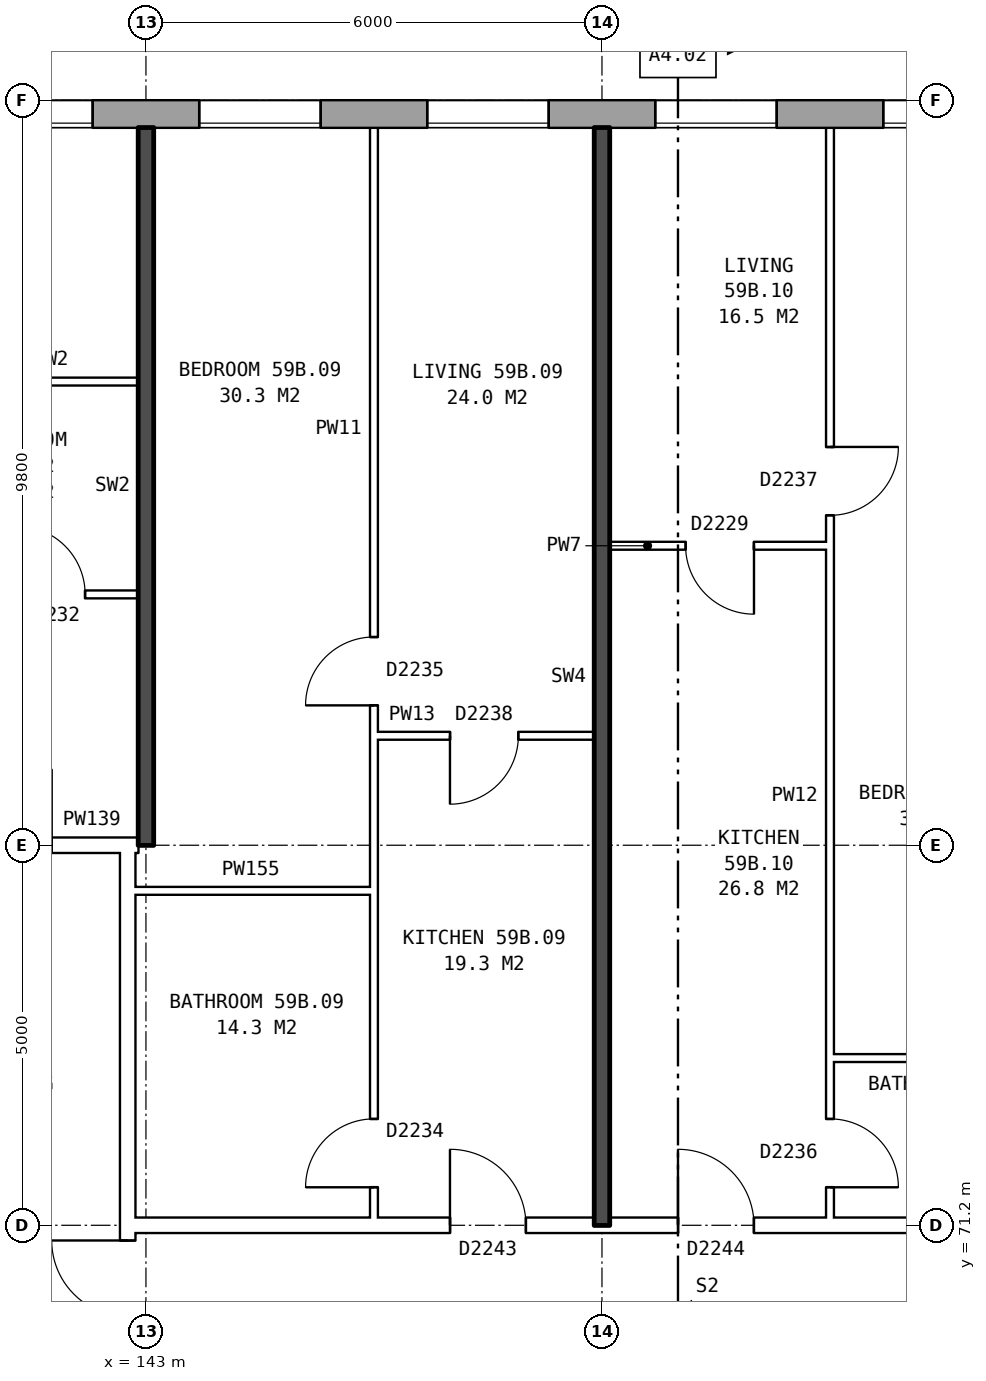
"""IFC4 building model, lengths in metres.
Left out: names, types, materials, properties, quantities, classifications, styles, units other than length and angle.
Written with IfcOpenShell. Run it as: python <this file> out.ifc"""

import sys

from ifc_helpers import new_model, si_unit, direction, frame, frame_2d, origin, place, context, subcontext, project, spatial, rectangle, extrude, element, fill, save


model = new_model("IFC4")
c1 = context("Model", 3, precision=1e-05, world=origin(), true_north=direction((0.0, 1.0)))
c2 = subcontext(c1, "Body", "Model", "MODEL_VIEW")
j1 = project(units=[si_unit("LENGTHUNIT", "METRE"), si_unit("PLANEANGLEUNIT", "RADIAN")], contexts=[c1])
p1 = place(None, origin())
s1 = spatial("IfcSite", under=j1, at=p1, CompositionType="ELEMENT")
p2 = place(p1, origin())
s2 = spatial("IfcBuilding", under=s1, at=p2, CompositionType="ELEMENT")
p3 = place(p2, frame((0.0, 0.0, 209.0)))
s3 = spatial("IfcBuildingStorey", under=s2, at=p3, CompositionType="ELEMENT", Elevation=209.0)
p4 = place(p3, frame((165.925, 85.82, 0.0), z_axis=(0.0, 0.0, 1.0), x_axis=(-1.0, 0.0, 0.0)))
e1 = element("IfcWall", 1, at=p4, inside=s3, PredefinedType="STANDARD", context=c2, shape_type="SweptSolid", body=[
    extrude(rectangle(XDim=33.875, YDim=0.36, at=frame_2d((16.938, 0.0))), origin(), (0.0, 0.0, 1.0), 2.85),
])
p5 = place(p4, frame((2.625, 0.0, 0.8)))
e2 = element("IfcOpeningElement", 2, at=p5, cuts=e1, PredefinedType="OPENING", context=c2, shape_type="SweptSolid", body=[
    extrude(rectangle(XDim=1.6, YDim=1.8, at=frame_2d((0.8, 0.9))), frame((0.0, 0.19, 0.0), z_axis=(0.0, -1.0, 0.0), x_axis=(1.0, 0.0, 0.0)), (0.0, 0.0, 1.0), 0.38),
])
p6 = place(p4, frame((5.625, 0.0, 0.8)))
e3 = element("IfcOpeningElement", 3, at=p6, cuts=e1, PredefinedType="OPENING", context=c2, shape_type="SweptSolid", body=[
    extrude(rectangle(XDim=1.6, YDim=1.8, at=frame_2d((0.8, 0.9))), frame((0.0, 0.19, 0.0), z_axis=(0.0, -1.0, 0.0), x_axis=(1.0, 0.0, 0.0)), (0.0, 0.0, 1.0), 0.38),
])
p7 = place(p4, frame((8.625, 0.0, 0.8)))
e4 = element("IfcOpeningElement", 4, at=p7, cuts=e1, PredefinedType="OPENING", context=c2, shape_type="SweptSolid", body=[
    extrude(rectangle(XDim=1.6, YDim=1.8, at=frame_2d((0.8, 0.9))), frame((0.0, 0.19, 0.0), z_axis=(0.0, -1.0, 0.0), x_axis=(1.0, 0.0, 0.0)), (0.0, 0.0, 1.0), 0.38),
])
p8 = place(p4, frame((11.625, 0.0, 0.8)))
e5 = element("IfcOpeningElement", 5, at=p8, cuts=e1, PredefinedType="OPENING", context=c2, shape_type="SweptSolid", body=[
    extrude(rectangle(XDim=1.6, YDim=1.8, at=frame_2d((0.8, 0.9))), frame((0.0, 0.19, 0.0), z_axis=(0.0, -1.0, 0.0), x_axis=(1.0, 0.0, 0.0)), (0.0, 0.0, 1.0), 0.38),
])
p9 = place(p4, frame((14.625, 0.0, 0.8)))
e6 = element("IfcOpeningElement", 6, at=p9, cuts=e1, PredefinedType="OPENING", context=c2, shape_type="SweptSolid", body=[
    extrude(rectangle(XDim=1.6, YDim=1.8, at=frame_2d((0.8, 0.9))), frame((0.0, 0.19, 0.0), z_axis=(0.0, -1.0, 0.0), x_axis=(1.0, 0.0, 0.0)), (0.0, 0.0, 1.0), 0.38),
])
p10 = place(p4, frame((17.625, 0.0, 0.8)))
e7 = element("IfcOpeningElement", 7, at=p10, cuts=e1, PredefinedType="OPENING", context=c2, shape_type="SweptSolid", body=[
    extrude(rectangle(XDim=1.6, YDim=1.8, at=frame_2d((0.8, 0.9))), frame((0.0, 0.19, 0.0), z_axis=(0.0, -1.0, 0.0), x_axis=(1.0, 0.0, 0.0)), (0.0, 0.0, 1.0), 0.38),
])
p11 = place(p4, frame((20.625, 0.0, 0.8)))
e8 = element("IfcOpeningElement", 8, at=p11, cuts=e1, PredefinedType="OPENING", context=c2, shape_type="SweptSolid", body=[
    extrude(rectangle(XDim=1.6, YDim=1.8, at=frame_2d((0.8, 0.9))), frame((0.0, 0.19, 0.0), z_axis=(0.0, -1.0, 0.0), x_axis=(1.0, 0.0, 0.0)), (0.0, 0.0, 1.0), 0.38),
])
p12 = place(p4, frame((23.625, 0.0, 0.8)))
e9 = element("IfcOpeningElement", 9, at=p12, cuts=e1, PredefinedType="OPENING", context=c2, shape_type="SweptSolid", body=[
    extrude(rectangle(XDim=1.6, YDim=1.8, at=frame_2d((0.8, 0.9))), frame((0.0, 0.19, 0.0), z_axis=(0.0, -1.0, 0.0), x_axis=(1.0, 0.0, 0.0)), (0.0, 0.0, 1.0), 0.38),
])
p13 = place(p4, frame((26.625, 0.0, 0.8)))
e10 = element("IfcOpeningElement", 10, at=p13, cuts=e1, PredefinedType="OPENING", context=c2, shape_type="SweptSolid", body=[
    extrude(rectangle(XDim=1.6, YDim=1.8, at=frame_2d((0.8, 0.9))), frame((0.0, 0.19, 0.0), z_axis=(0.0, -1.0, 0.0), x_axis=(1.0, 0.0, 0.0)), (0.0, 0.0, 1.0), 0.38),
])
p14 = place(p4, frame((30.925, 0.0, 1.1)))
e11 = element("IfcOpeningElement", 11, at=p14, cuts=e1, PredefinedType="OPENING", context=c2, shape_type="SweptSolid", body=[
    extrude(rectangle(XDim=0.8, YDim=1.5, at=frame_2d((0.4, 0.75))), frame((0.0, 0.19, 0.0), z_axis=(0.0, -1.0, 0.0), x_axis=(1.0, 0.0, 0.0)), (0.0, 0.0, 1.0), 0.38),
])
p15 = place(p4, frame((32.025, 0.0, 0.8)))
e12 = element("IfcOpeningElement", 12, at=p15, cuts=e1, PredefinedType="OPENING", context=c2, shape_type="SweptSolid", body=[
    extrude(rectangle(XDim=1.4, YDim=1.8, at=frame_2d((0.7, 0.9))), frame((0.0, 0.19, 0.0), z_axis=(0.0, -1.0, 0.0), x_axis=(1.0, 0.0, 0.0)), (0.0, 0.0, 1.0), 0.38),
])
p16 = place(p3, frame((142.76, 63.9, 0.0), z_axis=(0.0, 0.0, 1.0), x_axis=(0.0, 1.0, 0.0)))
e13 = element("IfcWall", 13, at=p16, inside=s3, PredefinedType="PARTITIONING", context=c2, shape_type="SweptSolid", body=[
    extrude(rectangle(XDim=12.2, YDim=0.2, at=frame_2d((6.1, 0.0))), origin(), (0.0, 0.0, 1.0), 2.85),
])
p17 = place(p16, frame((5.1, 0.0, 0.0)))
e14 = element("IfcOpeningElement", 14, at=p17, cuts=e13, PredefinedType="OPENING", context=c2, shape_type="SweptSolid", body=[
    extrude(rectangle(XDim=2.0, YDim=2.1, at=frame_2d((1.0, 1.05))), frame((0.0, 0.11, 0.0), z_axis=(0.0, -1.0, 0.0), x_axis=(1.0, 0.0, 0.0)), (0.0, 0.0, 1.0), 0.22),
])
p18 = place(p3, frame((142.76, 71.2, 0.0), z_axis=(0.0, 0.0, 1.0), x_axis=(1.0, 0.0, 0.0)))
e15 = element("IfcWall", 15, at=p18, inside=s3, PredefinedType="PARTITIONING", context=c2, shape_type="SweptSolid", body=[
    extrude(rectangle(XDim=14.48, YDim=0.2, at=frame_2d((7.24, 0.0))), origin(), (0.0, 0.0, 1.0), 2.85),
])
p19 = place(p18, frame((4.24, 0.0, 0.0)))
e16 = element("IfcOpeningElement", 16, at=p19, cuts=e15, PredefinedType="OPENING", context=c2, shape_type="SweptSolid", body=[
    extrude(rectangle(XDim=1.0, YDim=2.1, at=frame_2d((0.5, 1.05))), frame((0.0, 0.11, 0.0), z_axis=(0.0, -1.0, 0.0), x_axis=(1.0, 0.0, 0.0)), (0.0, 0.0, 1.0), 0.22),
])
p20 = place(p18, frame((7.24, 0.0, 0.0)))
e17 = element("IfcOpeningElement", 17, at=p20, cuts=e15, PredefinedType="OPENING", context=c2, shape_type="SweptSolid", body=[
    extrude(rectangle(XDim=1.0, YDim=2.1, at=frame_2d((0.5, 1.05))), frame((0.0, 0.11, 0.0), z_axis=(0.0, -1.0, 0.0), x_axis=(1.0, 0.0, 0.0)), (0.0, 0.0, 1.0), 0.22),
])
p21 = place(p3, frame((152.0, 73.4, 0.0), z_axis=(0.0, 0.0, 1.0), x_axis=(1.0, 0.0, 0.0)))
e18 = element("IfcWall", 18, at=p21, inside=s3, PredefinedType="PARTITIONING", context=c2, shape_type="SweptSolid", body=[
    extrude(rectangle(XDim=2.9, YDim=0.1, at=frame_2d((1.45, 0.0))), origin(), (0.0, 0.0, 1.0), 2.85),
])
p22 = place(p3, frame((142.76, 75.6, 0.0), z_axis=(0.0, 0.0, 1.0), x_axis=(1.0, 0.0, 0.0)))
e19 = element("IfcWall", 19, at=p22, inside=s3, PredefinedType="PARTITIONING", context=c2, shape_type="SweptSolid", body=[
    extrude(rectangle(XDim=3.24, YDim=0.1, at=frame_2d((1.62, 0.0))), origin(), (0.0, 0.0, 1.0), 2.85),
])
p23 = place(p3, frame((139.76, 76.2, 0.0), z_axis=(0.0, 0.0, 1.0), x_axis=(1.0, 0.0, 0.0)))
e20 = element("IfcWall", 20, at=p23, inside=s3, PredefinedType="PARTITIONING", context=c2, shape_type="SweptSolid", body=[
    extrude(rectangle(XDim=3.0, YDim=0.2, at=frame_2d((1.5, 0.0))), origin(), (0.0, 0.0, 1.0), 2.85),
])
p24 = place(p23, frame((1.0, 0.0, 0.0)))
e21 = element("IfcOpeningElement", 21, at=p24, cuts=e20, PredefinedType="OPENING", context=c2, shape_type="SweptSolid", body=[
    extrude(rectangle(XDim=1.0, YDim=2.1, at=frame_2d((0.5, 1.05))), frame((0.0, 0.11, 0.0), z_axis=(0.0, -1.0, 0.0), x_axis=(1.0, 0.0, 0.0)), (0.0, 0.0, 1.0), 0.22),
])
p25 = place(p3, frame((142.76, 76.2, 0.0), z_axis=(0.0, 0.0, 1.0), x_axis=(1.0, 0.0, 0.0)))
e22 = element("IfcWall", 22, at=p25, inside=s3, PredefinedType="PARTITIONING", context=c2, shape_type="SweptSolid", body=[
    extrude(rectangle(XDim=0.14, YDim=0.2, at=frame_2d((0.07, 0.0))), origin(), (0.0, 0.0, 1.0), 2.85),
])
p26 = place(p3, frame((146.0, 77.64, 0.0), z_axis=(0.0, 0.0, 1.0), x_axis=(1.0, 0.0, 0.0)))
e23 = element("IfcWall", 23, at=p26, inside=s3, PredefinedType="PARTITIONING", context=c2, shape_type="SweptSolid", body=[
    extrude(rectangle(XDim=2.9, YDim=0.1, at=frame_2d((1.45, 0.0))), origin(), (0.0, 0.0, 1.0), 2.85),
])
p27 = place(p26, frame((1.0, 0.0, 0.0)))
e24 = element("IfcOpeningElement", 24, at=p27, cuts=e23, PredefinedType="OPENING", context=c2, shape_type="SweptSolid", body=[
    extrude(rectangle(XDim=0.9, YDim=2.1, at=frame_2d((0.45, 1.05))), frame((0.0, 0.06, 0.0), z_axis=(0.0, -1.0, 0.0), x_axis=(1.0, 0.0, 0.0)), (0.0, 0.0, 1.0), 0.12),
])
p28 = place(p3, frame((131.1, 79.5, 0.0), z_axis=(0.0, 0.0, 1.0), x_axis=(1.0, 0.0, 0.0)))
e25 = element("IfcWall", 25, at=p28, inside=s3, PredefinedType="PARTITIONING", context=c2, shape_type="SweptSolid", body=[
    extrude(rectangle(XDim=11.8, YDim=0.1, at=frame_2d((5.9, 0.0))), origin(), (0.0, 0.0, 1.0), 2.85),
])
p29 = place(p28, frame((7.25, 0.0, 0.0)))
e26 = element("IfcOpeningElement", 26, at=p29, cuts=e25, PredefinedType="OPENING", context=c2, shape_type="SweptSolid", body=[
    extrude(rectangle(XDim=0.9, YDim=2.1, at=frame_2d((0.45, 1.05))), frame((0.0, 0.06, 0.0), z_axis=(0.0, -1.0, 0.0), x_axis=(1.0, 0.0, 0.0)), (0.0, 0.0, 1.0), 0.12),
])
p30 = place(p28, frame((10.2, 0.0, 0.0)))
e27 = element("IfcOpeningElement", 27, at=p30, cuts=e25, PredefinedType="OPENING", context=c2, shape_type="SweptSolid", body=[
    extrude(rectangle(XDim=0.9, YDim=2.1, at=frame_2d((0.45, 1.05))), frame((0.0, 0.06, 0.0), z_axis=(0.0, -1.0, 0.0), x_axis=(1.0, 0.0, 0.0)), (0.0, 0.0, 1.0), 0.12),
])
p31 = place(p3, frame((149.1, 80.14, 0.0), z_axis=(0.0, 0.0, 1.0), x_axis=(1.0, 0.0, 0.0)))
e28 = element("IfcWall", 28, at=p31, inside=s3, PredefinedType="PARTITIONING", context=c2, shape_type="SweptSolid", body=[
    extrude(rectangle(XDim=2.9, YDim=0.1, at=frame_2d((1.45, 0.0))), origin(), (0.0, 0.0, 1.0), 2.85),
])
p32 = place(p31, frame((1.0, 0.0, 0.0)))
e29 = element("IfcOpeningElement", 29, at=p32, cuts=e28, PredefinedType="OPENING", context=c2, shape_type="SweptSolid", body=[
    extrude(rectangle(XDim=0.9, YDim=2.1, at=frame_2d((0.45, 1.05))), frame((0.0, 0.06, 0.0), z_axis=(0.0, -1.0, 0.0), x_axis=(1.0, 0.0, 0.0)), (0.0, 0.0, 1.0), 0.12),
])
p33 = place(p3, frame((140.6, 82.3, 0.0), z_axis=(0.0, 0.0, 1.0), x_axis=(1.0, 0.0, 0.0)))
e30 = element("IfcWall", 30, at=p33, inside=s3, PredefinedType="PARTITIONING", context=c2, shape_type="SweptSolid", body=[
    extrude(rectangle(XDim=2.3, YDim=0.1, at=frame_2d((1.15, 0.0))), origin(), (0.0, 0.0, 1.0), 2.85),
])
p34 = place(p3, frame((143.0, 76.2, 0.0), z_axis=(0.0, 0.0, 1.0), x_axis=(0.0, 1.0, 0.0)))
e31 = element("IfcWall", 31, at=p34, inside=s3, PredefinedType="SOLIDWALL", context=c2, shape_type="SweptSolid", body=[
    extrude(rectangle(XDim=9.44, YDim=0.2, at=frame_2d((4.72, 0.0))), origin(), (0.0, 0.0, 1.0), 2.85),
])
p35 = place(p3, frame((146.0, 71.3, 0.0), z_axis=(0.0, 0.0, 1.0), x_axis=(0.0, 1.0, 0.0)))
e32 = element("IfcWall", 32, at=p35, inside=s3, PredefinedType="PARTITIONING", context=c2, shape_type="SweptSolid", body=[
    extrude(rectangle(XDim=14.34, YDim=0.1, at=frame_2d((7.17, 0.0))), origin(), (0.0, 0.0, 1.0), 2.85),
])
p36 = place(p35, frame((6.74, 0.0, 0.0)))
e33 = element("IfcOpeningElement", 33, at=p36, cuts=e32, PredefinedType="OPENING", context=c2, shape_type="SweptSolid", body=[
    extrude(rectangle(XDim=0.9, YDim=2.1, at=frame_2d((0.45, 1.05))), frame((0.0, 0.06, 0.0), z_axis=(0.0, -1.0, 0.0), x_axis=(1.0, 0.0, 0.0)), (0.0, 0.0, 1.0), 0.12),
])
p37 = place(p35, frame((0.4, 0.0, 0.0)))
e34 = element("IfcOpeningElement", 34, at=p37, cuts=e32, PredefinedType="OPENING", context=c2, shape_type="SweptSolid", body=[
    extrude(rectangle(XDim=0.9, YDim=2.1, at=frame_2d((0.45, 1.05))), frame((0.0, 0.06, 0.0), z_axis=(0.0, -1.0, 0.0), x_axis=(1.0, 0.0, 0.0)), (0.0, 0.0, 1.0), 0.12),
])
p38 = place(p3, frame((149.0, 71.2, 0.0), z_axis=(0.0, 0.0, 1.0), x_axis=(0.0, 1.0, 0.0)))
e35 = element("IfcWall", 35, at=p38, inside=s3, PredefinedType="SOLIDWALL", context=c2, shape_type="SweptSolid", body=[
    extrude(rectangle(XDim=14.44, YDim=0.2, at=frame_2d((7.22, 0.0))), origin(), (0.0, 0.0, 1.0), 2.85),
])
p39 = place(p3, frame((152.0, 71.3, 0.0), z_axis=(0.0, 0.0, 1.0), x_axis=(0.0, 1.0, 0.0)))
e36 = element("IfcWall", 36, at=p39, inside=s3, PredefinedType="PARTITIONING", context=c2, shape_type="SweptSolid", body=[
    extrude(rectangle(XDim=14.34, YDim=0.1, at=frame_2d((7.17, 0.0))), origin(), (0.0, 0.0, 1.0), 2.85),
])
p40 = place(p39, frame((9.24, 0.0, 0.0)))
e37 = element("IfcOpeningElement", 37, at=p40, cuts=e36, PredefinedType="OPENING", context=c2, shape_type="SweptSolid", body=[
    extrude(rectangle(XDim=0.9, YDim=2.1, at=frame_2d((0.45, 1.05))), frame((0.0, 0.06, 0.0), z_axis=(0.0, -1.0, 0.0), x_axis=(1.0, 0.0, 0.0)), (0.0, 0.0, 1.0), 0.12),
])
p41 = place(p39, frame((0.4, 0.0, 0.0)))
e38 = element("IfcOpeningElement", 38, at=p41, cuts=e36, PredefinedType="OPENING", context=c2, shape_type="SweptSolid", body=[
    extrude(rectangle(XDim=0.9, YDim=2.1, at=frame_2d((0.45, 1.05))), frame((0.0, 0.06, 0.0), z_axis=(0.0, -1.0, 0.0), x_axis=(1.0, 0.0, 0.0)), (0.0, 0.0, 1.0), 0.12),
])
p42 = place(p8, origin())
e39 = element("IfcWindow", 39, at=p42, inside=s3, PartitioningType="SINGLE_PANEL", PredefinedType="WINDOW", context=c2, shape_type="SweptSolid", body=[
    extrude(rectangle(XDim=1.6, YDim=1.8, at=frame_2d((0.8, 0.9))), frame((0.0, 0.15, 0.0), z_axis=(0.0, -1.0, 0.0), x_axis=(1.0, 0.0, 0.0)), (0.0, 0.0, 1.0), 0.06),
])
fill(e5, e39)
p43 = place(p9, origin())
e40 = element("IfcWindow", 40, at=p43, inside=s3, PartitioningType="SINGLE_PANEL", PredefinedType="WINDOW", context=c2, shape_type="SweptSolid", body=[
    extrude(rectangle(XDim=1.6, YDim=1.8, at=frame_2d((0.8, 0.9))), frame((0.0, 0.15, 0.0), z_axis=(0.0, -1.0, 0.0), x_axis=(1.0, 0.0, 0.0)), (0.0, 0.0, 1.0), 0.06),
])
fill(e6, e40)
p44 = place(p10, origin())
e41 = element("IfcWindow", 41, at=p44, inside=s3, PartitioningType="SINGLE_PANEL", PredefinedType="WINDOW", context=c2, shape_type="SweptSolid", body=[
    extrude(rectangle(XDim=1.6, YDim=1.8, at=frame_2d((0.8, 0.9))), frame((0.0, 0.15, 0.0), z_axis=(0.0, -1.0, 0.0), x_axis=(1.0, 0.0, 0.0)), (0.0, 0.0, 1.0), 0.06),
])
fill(e7, e41)
p45 = place(p11, origin())
e42 = element("IfcWindow", 42, at=p45, inside=s3, PartitioningType="SINGLE_PANEL", PredefinedType="WINDOW", context=c2, shape_type="SweptSolid", body=[
    extrude(rectangle(XDim=1.6, YDim=1.8, at=frame_2d((0.8, 0.9))), frame((0.0, 0.15, 0.0), z_axis=(0.0, -1.0, 0.0), x_axis=(1.0, 0.0, 0.0)), (0.0, 0.0, 1.0), 0.06),
])
fill(e8, e42)
p46 = place(p12, origin())
e43 = element("IfcWindow", 43, at=p46, inside=s3, PartitioningType="SINGLE_PANEL", PredefinedType="WINDOW", context=c2, shape_type="SweptSolid", body=[
    extrude(rectangle(XDim=1.6, YDim=1.8, at=frame_2d((0.8, 0.9))), frame((0.0, 0.15, 0.0), z_axis=(0.0, -1.0, 0.0), x_axis=(1.0, 0.0, 0.0)), (0.0, 0.0, 1.0), 0.06),
])
fill(e9, e43)
p47 = place(p17, origin())
e44 = element("IfcDoor", 44, at=p47, inside=s3, OperationType="DOUBLE_DOOR_SINGLE_SWING", PredefinedType="DOOR", context=c2, shape_type="SweptSolid", body=[
    extrude(rectangle(XDim=2.0, YDim=2.1, at=frame_2d((1.0, 1.05))), frame((0.0, 0.025, 0.0), z_axis=(0.0, -1.0, 0.0), x_axis=(1.0, 0.0, 0.0)), (0.0, 0.0, 1.0), 0.05),
])
fill(e14, e44)
p48 = place(p30, origin())
e45 = element("IfcDoor", 45, at=p48, inside=s3, OperationType="SINGLE_SWING_LEFT", PredefinedType="DOOR", context=c2, shape_type="SweptSolid", body=[
    extrude(rectangle(XDim=0.9, YDim=2.1, at=frame_2d((0.45, 1.05))), frame((0.0, 0.025, 0.0), z_axis=(0.0, -1.0, 0.0), x_axis=(1.0, 0.0, 0.0)), (0.0, 0.0, 1.0), 0.05),
])
fill(e27, e45)
p49 = place(p36, origin())
e46 = element("IfcDoor", 46, at=p49, inside=s3, OperationType="SINGLE_SWING_LEFT", PredefinedType="DOOR", context=c2, shape_type="SweptSolid", body=[
    extrude(rectangle(XDim=0.9, YDim=2.1, at=frame_2d((0.45, 1.05))), frame((0.0, 0.025, 0.0), z_axis=(0.0, -1.0, 0.0), x_axis=(1.0, 0.0, 0.0)), (0.0, 0.0, 1.0), 0.05),
])
fill(e33, e46)
p50 = place(p19, origin())
e47 = element("IfcDoor", 47, at=p50, inside=s3, OperationType="SINGLE_SWING_LEFT", PredefinedType="DOOR", context=c2, shape_type="SweptSolid", body=[
    extrude(rectangle(XDim=1.0, YDim=2.1, at=frame_2d((0.5, 1.05))), frame((0.0, 0.025, 0.0), z_axis=(0.0, -1.0, 0.0), x_axis=(1.0, 0.0, 0.0)), (0.0, 0.0, 1.0), 0.05),
])
fill(e16, e47)
p51 = place(p27, frame((0.9, 0.0, 0.0), z_axis=(0.0, 0.0, 1.0), x_axis=(-1.0, 0.0, 0.0)))
e48 = element("IfcDoor", 48, at=p51, inside=s3, OperationType="SINGLE_SWING_RIGHT", PredefinedType="DOOR", context=c2, shape_type="SweptSolid", body=[
    extrude(rectangle(XDim=0.9, YDim=2.1, at=frame_2d((0.45, 1.05))), frame((0.0, 0.025, 0.0), z_axis=(0.0, -1.0, 0.0), x_axis=(1.0, 0.0, 0.0)), (0.0, 0.0, 1.0), 0.05),
])
fill(e24, e48)
p52 = place(p37, origin())
e49 = element("IfcDoor", 49, at=p52, inside=s3, OperationType="SINGLE_SWING_LEFT", PredefinedType="DOOR", context=c2, shape_type="SweptSolid", body=[
    extrude(rectangle(XDim=0.9, YDim=2.1, at=frame_2d((0.45, 1.05))), frame((0.0, 0.025, 0.0), z_axis=(0.0, -1.0, 0.0), x_axis=(1.0, 0.0, 0.0)), (0.0, 0.0, 1.0), 0.05),
])
fill(e34, e49)
p53 = place(p40, frame((0.9, 0.0, 0.0), z_axis=(0.0, 0.0, 1.0), x_axis=(-1.0, 0.0, 0.0)))
e50 = element("IfcDoor", 50, at=p53, inside=s3, OperationType="SINGLE_SWING_LEFT", PredefinedType="DOOR", context=c2, shape_type="SweptSolid", body=[
    extrude(rectangle(XDim=0.9, YDim=2.1, at=frame_2d((0.45, 1.05))), frame((0.0, 0.025, 0.0), z_axis=(0.0, -1.0, 0.0), x_axis=(1.0, 0.0, 0.0)), (0.0, 0.0, 1.0), 0.05),
])
fill(e37, e50)
p54 = place(p20, origin())
e51 = element("IfcDoor", 51, at=p54, inside=s3, OperationType="SINGLE_SWING_LEFT", PredefinedType="DOOR", context=c2, shape_type="SweptSolid", body=[
    extrude(rectangle(XDim=1.0, YDim=2.1, at=frame_2d((0.5, 1.05))), frame((0.0, 0.025, 0.0), z_axis=(0.0, -1.0, 0.0), x_axis=(1.0, 0.0, 0.0)), (0.0, 0.0, 1.0), 0.05),
])
fill(e17, e51)
p55 = place(p32, frame((0.9, 0.0, 0.0), z_axis=(0.0, 0.0, 1.0), x_axis=(-1.0, 0.0, 0.0)))
e52 = element("IfcDoor", 52, at=p55, inside=s3, OperationType="SINGLE_SWING_LEFT", PredefinedType="DOOR", context=c2, shape_type="SweptSolid", body=[
    extrude(rectangle(XDim=0.9, YDim=2.1, at=frame_2d((0.45, 1.05))), frame((0.0, 0.025, 0.0), z_axis=(0.0, -1.0, 0.0), x_axis=(1.0, 0.0, 0.0)), (0.0, 0.0, 1.0), 0.05),
])
fill(e29, e52)
p56 = place(p41, frame((0.9, 0.0, 0.0), z_axis=(0.0, 0.0, 1.0), x_axis=(-1.0, 0.0, 0.0)))
e53 = element("IfcDoor", 53, at=p56, inside=s3, OperationType="SINGLE_SWING_RIGHT", PredefinedType="DOOR", context=c2, shape_type="SweptSolid", body=[
    extrude(rectangle(XDim=0.9, YDim=2.1, at=frame_2d((0.45, 1.05))), frame((0.0, 0.025, 0.0), z_axis=(0.0, -1.0, 0.0), x_axis=(1.0, 0.0, 0.0)), (0.0, 0.0, 1.0), 0.05),
])
fill(e38, e53)
save(model, sys.argv[1])
